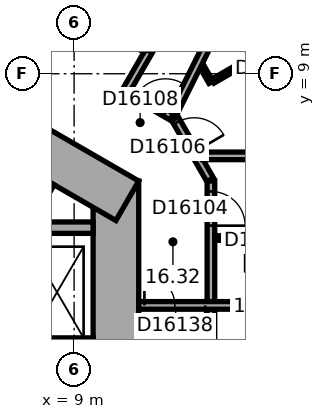
"""IFC4 building model, lengths in metres.
Left out: names, types, materials, properties, quantities, classifications, styles, units other than length and angle.
Written with IfcOpenShell. Run it as: python <this file> out.ifc"""

import sys

from ifc_helpers import new_model, si_unit, direction, frame, frame_2d, origin, place, context, subcontext, project, spatial, rectangle, extrude, element, fill, save


model = new_model("IFC4")
c1 = context("Model", 3, precision=1e-05, world=origin(), true_north=direction((0.0, 1.0)))
c2 = subcontext(c1, "Body", "Model", "MODEL_VIEW")
j1 = project(units=[si_unit("LENGTHUNIT", "METRE"), si_unit("PLANEANGLEUNIT", "RADIAN")], contexts=[c1])
p1 = place(None, origin())
s1 = spatial("IfcSite", under=j1, at=p1, CompositionType="ELEMENT")
p2 = place(p1, origin())
s2 = spatial("IfcBuilding", under=s1, at=p2, CompositionType="ELEMENT")
p3 = place(p2, frame((0.0, 0.0, 73.7)))
s3 = spatial("IfcBuildingStorey", under=s2, at=p3, CompositionType="ELEMENT", Elevation=73.7)
p4 = place(p3, frame((10.1, -6.177, 0.0), z_axis=(0.0, 0.0, 1.0), x_axis=(0.0, 1.0, 0.0)))
e1 = element("IfcWall", 1, at=p4, inside=s3, PredefinedType="SHEAR", context=c2, shape_type="SweptSolid", body=[
    extrude(rectangle(XDim=12.355, YDim=1.2, at=frame_2d((6.177, 0.0))), origin(), (0.0, 0.0, 1.0), 3.3),
])
p5 = place(p4, frame((6.378, 0.0, 0.0)))
e2 = element("IfcOpeningElement", 2, at=p5, cuts=e1, PredefinedType="OPENING", context=c2, shape_type="SweptSolid", body=[
    extrude(rectangle(XDim=1.5, YDim=2.1, at=frame_2d((0.75, 1.05))), frame((0.0, 0.61, 0.0), z_axis=(0.0, -1.0, 0.0), x_axis=(1.0, 0.0, 0.0)), (0.0, 0.0, 1.0), 1.22),
])
p6 = place(p4, frame((1.828, 0.0, 0.0)))
e3 = element("IfcOpeningElement", 3, at=p6, cuts=e1, PredefinedType="OPENING", context=c2, shape_type="SweptSolid", body=[
    extrude(rectangle(XDim=1.1, YDim=2.1, at=frame_2d((0.55, 1.05))), frame((0.0, 0.61, 0.0), z_axis=(0.0, -1.0, 0.0), x_axis=(1.0, 0.0, 0.0)), (0.0, 0.0, 1.0), 1.22),
])
p7 = place(p4, frame((4.427, 0.0, 0.0)))
e4 = element("IfcOpeningElement", 4, at=p7, cuts=e1, PredefinedType="OPENING", context=c2, shape_type="SweptSolid", body=[
    extrude(rectangle(XDim=1.1, YDim=2.1, at=frame_2d((0.55, 1.05))), frame((0.0, 0.61, 0.0), z_axis=(0.0, -1.0, 0.0), x_axis=(1.0, 0.0, 0.0)), (0.0, 0.0, 1.0), 1.22),
])
p8 = place(p3, frame((10.4, 5.658, 0.0), z_axis=(0.0, 0.0, 1.0), x_axis=(-0.866021384402, 0.500006961711, 0.0)))
e5 = element("IfcWall", 5, at=p8, inside=s3, PredefinedType="SHEAR", context=c2, shape_type="SweptSolid", body=[
    extrude(rectangle(XDim=12.355, YDim=1.2, at=frame_2d((6.178, 0.0))), origin(), (0.0, 0.0, 1.0), 3.3),
])
p9 = place(p8, frame((2.728, 0.0, 0.0)))
e6 = element("IfcOpeningElement", 6, at=p9, cuts=e5, PredefinedType="OPENING", context=c2, shape_type="SweptSolid", body=[
    extrude(rectangle(XDim=1.1, YDim=2.1, at=frame_2d((0.55, 1.05))), frame((0.0, 0.61, 0.0), z_axis=(0.0, -1.0, 0.0), x_axis=(1.0, 0.0, 0.0)), (0.0, 0.0, 1.0), 1.22),
])
p10 = place(p8, frame((5.328, 0.0, 0.0)))
e7 = element("IfcOpeningElement", 7, at=p10, cuts=e5, PredefinedType="OPENING", context=c2, shape_type="SweptSolid", body=[
    extrude(rectangle(XDim=1.1, YDim=2.1, at=frame_2d((0.55, 1.05))), frame((0.0, 0.61, 0.0), z_axis=(0.0, -1.0, 0.0), x_axis=(1.0, 0.0, 0.0)), (0.0, 0.0, 1.0), 1.22),
])
p11 = place(p8, frame((7.928, 0.0, 0.0)))
e8 = element("IfcOpeningElement", 8, at=p11, cuts=e5, PredefinedType="OPENING", context=c2, shape_type="SweptSolid", body=[
    extrude(rectangle(XDim=1.1, YDim=2.1, at=frame_2d((0.55, 1.05))), frame((0.0, 0.61, 0.0), z_axis=(0.0, -1.0, 0.0), x_axis=(1.0, 0.0, 0.0)), (0.0, 0.0, 1.0), 1.22),
])
p12 = place(p3, frame((7.287, 4.222, 0.0), z_axis=(0.0, 0.0, 1.0), x_axis=(0.499946605688, 0.86605622881, 0.0)))
e9 = element("IfcWall", 9, at=p12, inside=s3, PredefinedType="PARTITIONING", context=c2, shape_type="SweptSolid", body=[
    extrude(rectangle(XDim=2.2, YDim=0.2, at=frame_2d((1.1, 0.0))), origin(), (0.0, 0.0, 1.0), 2.95),
])
p13 = place(p3, frame((7.3, 1.9, 0.0), z_axis=(0.0, 0.0, 1.0), x_axis=(1.0, 0.0, 0.0)))
e10 = element("IfcWall", 10, at=p13, inside=s3, PredefinedType="SHEAR", context=c2, shape_type="SweptSolid", body=[
    extrude(rectangle(XDim=2.2, YDim=0.3, at=frame_2d((1.1, 0.0))), origin(), (0.0, 0.0, 1.0), 2.95),
])
p14 = place(p13, frame((0.7, 0.0, 0.0)))
e11 = element("IfcOpeningElement", 11, at=p14, cuts=e10, PredefinedType="OPENING", context=c2, shape_type="SweptSolid", body=[
    extrude(rectangle(XDim=1.1, YDim=2.1, at=frame_2d((0.55, 1.05))), frame((0.0, 0.16, 0.0), z_axis=(0.0, -1.0, 0.0), x_axis=(1.0, 0.0, 0.0)), (0.0, 0.0, 1.0), 0.32),
])
p15 = place(p3, frame((7.3, 4.95, 0.0), z_axis=(0.0, 0.0, 1.0), x_axis=(1.0, 0.0, 0.0)))
e12 = element("IfcWall", 12, at=p15, inside=s3, PredefinedType="SHEAR", context=c2, shape_type="SweptSolid", body=[
    extrude(rectangle(XDim=2.2, YDim=0.3, at=frame_2d((1.1, 0.0))), origin(), (0.0, 0.0, 1.0), 2.95),
])
p16 = place(p3, frame((10.371, 8.561, 0.0), z_axis=(0.0, 0.0, 1.0), x_axis=(0.499986357472, 0.866033280158, 0.0)))
e13 = element("IfcWall", 13, at=p16, inside=s3, PredefinedType="PARTITIONING", context=c2, shape_type="SweptSolid", body=[
    extrude(rectangle(XDim=1.201, YDim=0.2, at=frame_2d((0.601, 0.0))), origin(), (0.0, 0.0, 1.0), 2.95),
])
p17 = place(p3, frame((11.566, 7.871, 0.0), z_axis=(0.0, 0.0, 1.0), x_axis=(-0.866004557827, 0.500036104519, 0.0)))
e14 = element("IfcWall", 14, at=p17, inside=s3, PredefinedType="PARTITIONING", context=c2, shape_type="SweptSolid", body=[
    extrude(rectangle(XDim=1.28, YDim=0.2, at=frame_2d((0.64, 0.0))), origin(), (0.0, 0.0, 1.0), 2.95),
])
p18 = place(p17, frame((0.19, 0.0, 0.0)))
e15 = element("IfcOpeningElement", 15, at=p18, cuts=e14, PredefinedType="OPENING", context=c2, shape_type="SweptSolid", body=[
    extrude(rectangle(XDim=0.9, YDim=2.1, at=frame_2d((0.45, 1.05))), frame((0.0, 0.11, 0.0), z_axis=(0.0, -1.0, 0.0), x_axis=(1.0, 0.0, 0.0)), (0.0, 0.0, 1.0), 0.22),
])
p19 = place(p3, frame((12.58, 6.212, 0.0), z_axis=(0.0, 0.0, 1.0), x_axis=(-0.500063286585, 0.865988862174, 0.0)))
e16 = element("IfcWall", 16, at=p19, inside=s3, PredefinedType="PARTITIONING", context=c2, shape_type="SweptSolid", body=[
    extrude(rectangle(XDim=1.86, YDim=0.2, at=frame_2d((0.93, 0.0))), origin(), (0.0, 0.0, 1.0), 2.95),
])
p20 = place(p19, frame((0.842, 0.0, 0.0)))
e17 = element("IfcOpeningElement", 17, at=p20, cuts=e16, PredefinedType="OPENING", context=c2, shape_type="SweptSolid", body=[
    extrude(rectangle(XDim=0.9, YDim=2.1, at=frame_2d((0.45, 1.05))), frame((0.0, 0.11, 0.0), z_axis=(0.0, -1.0, 0.0), x_axis=(1.0, 0.0, 0.0)), (0.0, 0.0, 1.0), 0.22),
])
p21 = place(p3, frame((12.6, 0.201, 0.0), z_axis=(0.0, 0.0, 1.0), x_axis=(0.0, 1.0, 0.0)))
e18 = element("IfcWall", 18, at=p21, inside=s3, PredefinedType="PARTITIONING", context=c2, shape_type="SweptSolid", body=[
    extrude(rectangle(XDim=2.604, YDim=0.2, at=frame_2d((1.302, 0.0))), origin(), (0.0, 0.0, 1.0), 2.95),
])
p22 = place(p21, frame((0.852, 0.0, 0.0)))
e19 = element("IfcOpeningElement", 19, at=p22, cuts=e18, PredefinedType="OPENING", context=c2, shape_type="SweptSolid", body=[
    extrude(rectangle(XDim=0.9, YDim=2.1, at=frame_2d((0.45, 1.05))), frame((0.0, 0.11, 0.0), z_axis=(0.0, -1.0, 0.0), x_axis=(1.0, 0.0, 0.0)), (0.0, 0.0, 1.0), 0.22),
])
p23 = place(p3, frame((12.6, 3.004, 0.0), z_axis=(0.0, 0.0, 1.0), x_axis=(0.0, 1.0, 0.0)))
e20 = element("IfcWall", 20, at=p23, inside=s3, PredefinedType="PARTITIONING", context=c2, shape_type="SweptSolid", body=[
    extrude(rectangle(XDim=3.173, YDim=0.2, at=frame_2d((1.586, 0.0))), origin(), (0.0, 0.0, 1.0), 2.95),
])
p24 = place(p23, frame((1.998, 0.0, 0.0)))
e21 = element("IfcOpeningElement", 21, at=p24, cuts=e20, PredefinedType="OPENING", context=c2, shape_type="SweptSolid", body=[
    extrude(rectangle(XDim=0.9, YDim=2.1, at=frame_2d((0.45, 1.05))), frame((0.0, 0.11, 0.0), z_axis=(0.0, -1.0, 0.0), x_axis=(1.0, 0.0, 0.0)), (0.0, 0.0, 1.0), 0.22),
])
p25 = place(p3, frame((12.601, 8.776, 0.0), z_axis=(0.0, 0.0, 1.0), x_axis=(-0.500166486798, 0.865929261247, 0.0)))
e22 = element("IfcWall", 22, at=p25, inside=s3, PredefinedType="PARTITIONING", context=c2, shape_type="SweptSolid", body=[
    extrude(rectangle(XDim=0.476, YDim=0.12, at=frame_2d((0.238, 0.0))), origin(), (0.0, 0.0, 1.0), 2.95),
])
p26 = place(p3, frame((12.7, 4.677, 0.0), z_axis=(0.0, 0.0, 1.0), x_axis=(1.0, 0.0, 0.0)))
e23 = element("IfcWall", 23, at=p26, inside=s3, PredefinedType="PARTITIONING", context=c2, shape_type="SweptSolid", body=[
    extrude(rectangle(XDim=2.5, YDim=0.12, at=frame_2d((1.25, 0.0))), origin(), (0.0, 0.0, 1.0), 2.95),
])
p27 = place(p26, frame((0.8, 0.0, 0.0)))
e24 = element("IfcOpeningElement", 24, at=p27, cuts=e23, PredefinedType="OPENING", context=c2, shape_type="SweptSolid", body=[
    extrude(rectangle(XDim=0.9, YDim=2.1, at=frame_2d((0.45, 1.05))), frame((0.0, 0.07, 0.0), z_axis=(0.0, -1.0, 0.0), x_axis=(1.0, 0.0, 0.0)), (0.0, 0.0, 1.0), 0.14),
])
p28 = place(p3, frame((14.974, 10.146, 0.0), z_axis=(0.0, 0.0, 1.0), x_axis=(-0.86599746015, -0.500048396672, 0.0)))
e25 = element("IfcWall", 25, at=p28, inside=s3, PredefinedType="PARTITIONING", context=c2, shape_type="SweptSolid", body=[
    extrude(rectangle(XDim=2.68, YDim=0.12, at=frame_2d((1.34, 0.0))), origin(), (0.0, 0.0, 1.0), 2.95),
])
p29 = place(p28, frame((0.69, 0.0, 0.0)))
e26 = element("IfcOpeningElement", 26, at=p29, cuts=e25, PredefinedType="OPENING", context=c2, shape_type="SweptSolid", body=[
    extrude(rectangle(XDim=0.9, YDim=2.1, at=frame_2d((0.45, 1.05))), frame((0.0, 0.07, 0.0), z_axis=(0.0, -1.0, 0.0), x_axis=(1.0, 0.0, 0.0)), (0.0, 0.0, 1.0), 0.14),
])
p30 = place(p3, frame((15.915, 16.592, 0.0), z_axis=(0.0, 0.0, 1.0), x_axis=(-0.446199736347, -0.894933402709, 0.0)))
e27 = element("IfcWall", 27, at=p30, inside=s3, PredefinedType="PARTITIONING", context=c2, shape_type="SweptSolid", body=[
    extrude(rectangle(XDim=9.635, YDim=0.2, at=frame_2d((4.817, 0.0))), origin(), (0.0, 0.0, 1.0), 2.95),
])
p31 = place(p3, frame((21.95, 2.905, 0.0), z_axis=(0.0, 0.0, 1.0), x_axis=(-1.0, 0.0, 0.0)))
e28 = element("IfcWall", 28, at=p31, inside=s3, PredefinedType="PARTITIONING", context=c2, shape_type="SweptSolid", body=[
    extrude(rectangle(XDim=11.25, YDim=0.2, at=frame_2d((5.625, 0.0))), origin(), (0.0, 0.0, 1.0), 2.95),
])
p32 = place(p31, frame((9.5, 0.0, 0.0)))
e29 = element("IfcOpeningElement", 29, at=p32, cuts=e28, PredefinedType="OPENING", context=c2, shape_type="SweptSolid", body=[
    extrude(rectangle(XDim=1.6, YDim=2.1, at=frame_2d((0.8, 1.05))), frame((0.0, 0.11, 0.0), z_axis=(0.0, -1.0, 0.0), x_axis=(1.0, 0.0, 0.0)), (0.0, 0.0, 1.0), 0.22),
])
p33 = place(p3, frame((21.95, 6.839, 0.0), z_axis=(0.0, 0.0, 1.0), x_axis=(-1.0, 0.0, 0.0)))
e30 = element("IfcWall", 30, at=p33, inside=s3, PredefinedType="PARTITIONING", context=c2, shape_type="SweptSolid", body=[
    extrude(rectangle(XDim=9.572, YDim=0.2, at=frame_2d((4.786, 0.0))), origin(), (0.0, 0.0, 1.0), 2.95),
])
p34 = place(p24, origin())
e31 = element("IfcDoor", 31, at=p34, inside=s3, OperationType="SINGLE_SWING_LEFT", PredefinedType="DOOR", context=c2, shape_type="SweptSolid", body=[
    extrude(rectangle(XDim=0.9, YDim=2.1, at=frame_2d((0.45, 1.05))), frame((0.0, 0.025, 0.0), z_axis=(0.0, -1.0, 0.0), x_axis=(1.0, 0.0, 0.0)), (0.0, 0.0, 1.0), 0.05),
])
fill(e21, e31)
p35 = place(p20, origin())
e32 = element("IfcDoor", 32, at=p35, inside=s3, OperationType="SINGLE_SWING_LEFT", PredefinedType="DOOR", context=c2, shape_type="SweptSolid", body=[
    extrude(rectangle(XDim=0.9, YDim=2.1, at=frame_2d((0.45, 1.05))), frame((0.0, 0.025, 0.0), z_axis=(0.0, -1.0, 0.0), x_axis=(1.0, 0.0, 0.0)), (0.0, 0.0, 1.0), 0.05),
])
fill(e17, e32)
p36 = place(p18, origin())
e33 = element("IfcDoor", 33, at=p36, inside=s3, OperationType="SINGLE_SWING_LEFT", PredefinedType="DOOR", context=c2, shape_type="SweptSolid", body=[
    extrude(rectangle(XDim=0.9, YDim=2.1, at=frame_2d((0.45, 1.05))), frame((0.0, 0.025, 0.0), z_axis=(0.0, -1.0, 0.0), x_axis=(1.0, 0.0, 0.0)), (0.0, 0.0, 1.0), 0.05),
])
fill(e15, e33)
p37 = place(p32, origin())
e34 = element("IfcDoor", 34, at=p37, inside=s3, OperationType="DOUBLE_DOOR_SINGLE_SWING", PredefinedType="DOOR", context=c2, shape_type="SweptSolid", body=[
    extrude(rectangle(XDim=1.6, YDim=2.1, at=frame_2d((0.8, 1.05))), frame((0.0, 0.025, 0.0), z_axis=(0.0, -1.0, 0.0), x_axis=(1.0, 0.0, 0.0)), (0.0, 0.0, 1.0), 0.05),
])
fill(e29, e34)
save(model, sys.argv[1])
